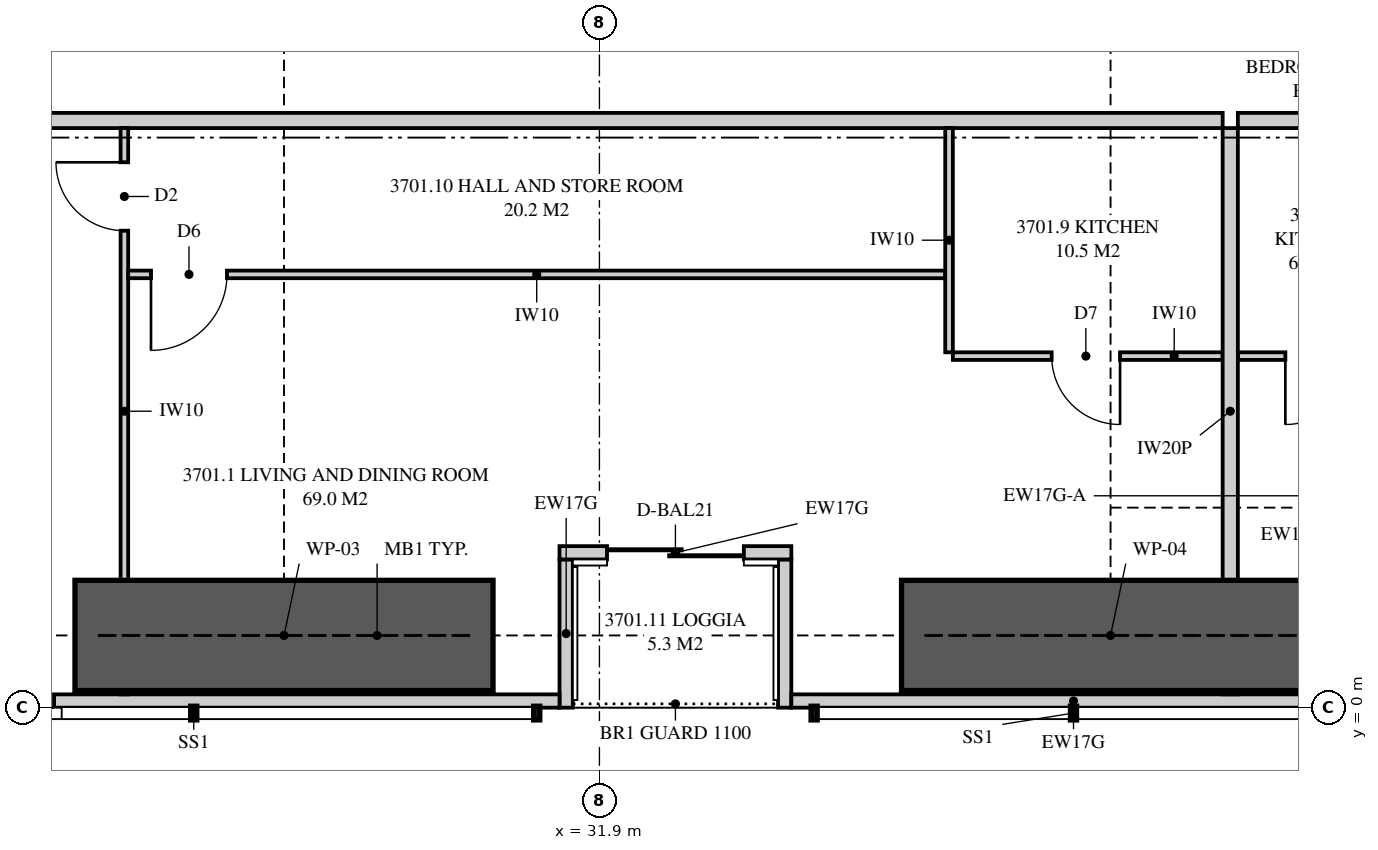
"""IFC4 building model, lengths in metres.
Left out: names, types, materials, properties, quantities, classifications, styles, units other than length and angle.
Written with IfcOpenShell. Run it as: python <this file> out.ifc"""

import sys

from ifc_helpers import new_model, si_unit, direction, frame, frame_2d, origin, place, context, subcontext, project, spatial, polyline, rectangle, outline, extrude, element, fill, save


model = new_model("IFC4")
c1 = context("Model", 3, precision=1e-05, world=origin(), true_north=direction((0.0, 1.0)))
c2 = subcontext(c1, "Body", "Model", "MODEL_VIEW")
j1 = project(units=[si_unit("LENGTHUNIT", "METRE"), si_unit("PLANEANGLEUNIT", "RADIAN")], contexts=[c1])
p1 = place(None, origin())
s1 = spatial("IfcSite", under=j1, at=p1, CompositionType="ELEMENT")
p2 = place(p1, origin())
s2 = spatial("IfcBuilding", under=s1, at=p2, CompositionType="ELEMENT")
p3 = place(p2, frame((0.0, 0.0, 135.0)))
s3 = spatial("IfcBuildingStorey", under=s2, at=p3, CompositionType="ELEMENT", Elevation=135.0)
p4 = place(p3, frame((9.051, 0.087, 0.0), z_axis=(0.0, 0.0, 1.0), x_axis=(1.0, 0.0, 0.0)))
e1 = element("IfcWall", 1, at=p4, inside=s3, PredefinedType="SOLIDWALL", context=c2, shape_type="SweptSolid", body=[
    extrude(outline(polyline([(0.0, 0.0), (22.324, 0.0), (22.324, 2.15), (7.824, 2.15), (7.824, 3.11), (7.666, 3.11), (7.666, 2.15), (7.62, 2.15), (7.62, 3.11), (0.0, 3.11), (0.0, 0.0)])), frame((0.0, 0.087, 0.0), z_axis=(0.0, -1.0, 0.0), x_axis=(1.0, 0.0, 0.0)), (0.0, 0.0, 1.0), 0.175),
])
p5 = place(p4, frame((3.134, 0.0, 0.4)))
e2 = element("IfcOpeningElement", 2, at=p5, cuts=e1, PredefinedType="OPENING", context=c2, shape_type="SweptSolid", body=[
    extrude(rectangle(XDim=1.8, YDim=1.7, at=frame_2d((0.9, 0.85))), frame((0.0, 0.097, 0.0), z_axis=(0.0, -1.0, 0.0), x_axis=(1.0, 0.0, 0.0)), (0.0, 0.0, 1.0), 0.195),
])
p6 = place(p4, frame((10.706, 0.0, 0.4)))
e3 = element("IfcOpeningElement", 3, at=p6, cuts=e1, PredefinedType="OPENING", context=c2, shape_type="SweptSolid", body=[
    extrude(rectangle(XDim=1.8, YDim=1.7, at=frame_2d((0.9, 0.85))), frame((0.0, 0.097, 0.0), z_axis=(0.0, -1.0, 0.0), x_axis=(1.0, 0.0, 0.0)), (0.0, 0.0, 1.0), 0.195),
])
p7 = place(p4, frame((13.874, 0.0, 0.4)))
e4 = element("IfcOpeningElement", 4, at=p7, cuts=e1, PredefinedType="OPENING", context=c2, shape_type="SweptSolid", body=[
    extrude(rectangle(XDim=1.8, YDim=1.7, at=frame_2d((0.9, 0.85))), frame((0.0, 0.097, 0.0), z_axis=(0.0, -1.0, 0.0), x_axis=(1.0, 0.0, 0.0)), (0.0, 0.0, 1.0), 0.195),
])
p8 = place(p3, frame((34.425, 0.087, 0.0), z_axis=(0.0, 0.0, 1.0), x_axis=(1.0, 0.0, 0.0)))
e5 = element("IfcWall", 5, at=p8, inside=s3, PredefinedType="SOLIDWALL", context=c2, shape_type="SweptSolid", body=[
    extrude(outline(polyline([(0.0, 0.0), (7.425, 0.0), (7.425, 3.11), (4.403, 3.11), (4.403, 2.15), (4.358, 2.15), (4.358, 3.11), (4.2, 3.11), (4.2, 2.15), (0.0, 2.15), (0.0, 0.0)])), frame((0.0, 0.087, 0.0), z_axis=(0.0, -1.0, 0.0), x_axis=(1.0, 0.0, 0.0)), (0.0, 0.0, 1.0), 0.175),
])
p9 = place(p3, frame((31.375, 2.038, 0.0), z_axis=(0.0, 0.0, 1.0), x_axis=(1.0, 0.0, 0.0)))
e6 = element("IfcWall", 6, at=p9, inside=s3, PredefinedType="SOLIDWALL", context=c2, shape_type="SweptSolid", body=[
    extrude(rectangle(XDim=3.05, YDim=0.175, at=frame_2d((1.525, 0.0))), origin(), (0.0, 0.0, 1.0), 3.11),
])
p10 = place(p9, frame((0.625, 0.0, 0.0)))
e7 = element("IfcOpeningElement", 7, at=p10, cuts=e6, PredefinedType="OPENING", context=c2, shape_type="SweptSolid", body=[
    extrude(rectangle(XDim=1.8, YDim=2.1, at=frame_2d((0.9, 1.05))), frame((0.0, 0.097, 0.0), z_axis=(0.0, -1.0, 0.0), x_axis=(1.0, 0.0, 0.0)), (0.0, 0.0, 1.0), 0.195),
])
for number, where, z_axis, x_axis in (
    (8, (31.462, 0.0, 0.0), (0.0, 0.0, 1.0), (0.0, 1.0, 0.0)),
    (9, (34.337, 0.0, 0.0), (0.0, 0.0, 1.0), (0.0, 1.0, 0.0)),
):
    element("IfcWall", number, at=place(p3, frame(where, z_axis=z_axis, x_axis=x_axis)), inside=s3, PredefinedType="SOLIDWALL", context=c2, shape_type="SweptSolid", body=[
        extrude(outline(polyline([(0.0, 0.0), (1.95, 0.0), (1.95, 3.11), (1.75, 3.11), (1.75, 2.15), (0.15, 2.15), (0.15, 3.11), (0.0, 3.11), (0.0, 0.0)])), frame((0.0, 0.087, 0.0), z_axis=(0.0, -1.0, 0.0), x_axis=(1.0, 0.0, 0.0)), (0.0, 0.0, 1.0), 0.175),
    ])
p11 = place(p3, frame((40.2, 0.175, 0.0), z_axis=(0.0, 0.0, 1.0), x_axis=(0.0, 1.0, 0.0)))
e10 = element("IfcWall", 10, at=p11, inside=s3, PredefinedType="PARTITIONING", context=c2, shape_type="SweptSolid", body=[
    extrude(outline(polyline([(0.167, 3.11), (0.0, 3.11), (0.0, 0.0), (0.529, 0.0), (0.529, 0.427), (1.021, 0.427), (1.021, 0.0), (7.45, 0.0), (7.45, 3.11), (3.766, 3.11), (3.766, 2.51), (2.025, 2.51), (2.025, 2.15), (1.021, 2.15), (1.021, 1.723), (0.529, 1.723), (0.529, 2.15), (0.167, 2.15), (0.167, 3.11)])), frame((0.0, 0.1, 0.0), z_axis=(0.0, -1.0, 0.0), x_axis=(1.0, 0.0, 0.0)), (0.0, 0.0, 1.0), 0.2),
])
p12 = place(p3, frame((17.775, 7.725, 0.0), z_axis=(0.0, 0.0, 1.0), x_axis=(1.0, 0.0, 0.0)))
e11 = element("IfcWall", 11, at=p12, inside=s3, PredefinedType="PARTITIONING", context=c2, shape_type="SweptSolid", body=[
    extrude(outline(polyline([(0.0, 0.0), (22.325, 0.0), (22.325, 3.11), (21.187, 3.11), (21.187, 2.541), (20.513, 2.541), (20.513, 3.11), (10.312, 3.11), (10.312, 2.541), (9.638, 2.541), (9.638, 3.11), (0.0, 3.11), (0.0, 0.0)])), frame((0.0, 0.1, 0.0), z_axis=(0.0, -1.0, 0.0), x_axis=(1.0, 0.0, 0.0)), (0.0, 0.0, 1.0), 0.2),
])
p13 = place(p12, frame((4.825, 0.0, 0.0)))
e12 = element("IfcOpeningElement", 12, at=p13, cuts=e11, PredefinedType="OPENING", context=c2, shape_type="SweptSolid", body=[
    extrude(rectangle(XDim=1.05, YDim=2.2, at=frame_2d((0.525, 1.1))), frame((0.0, 0.11, 0.0), z_axis=(0.0, -1.0, 0.0), x_axis=(1.0, 0.0, 0.0)), (0.0, 0.0, 1.0), 0.22),
])
p14 = place(p3, frame((25.65, 0.175, 0.0), z_axis=(0.0, 0.0, 1.0), x_axis=(0.0, 1.0, 0.0)))
e13 = element("IfcWall", 13, at=p14, inside=s3, PredefinedType="PARTITIONING", context=c2, shape_type="SweptSolid", body=[
    extrude(outline(polyline([(0.529, 2.15), (0.0, 2.15), (0.0, 0.0), (0.529, 0.0), (0.529, 0.034), (1.021, 0.034), (1.021, 0.0), (7.45, 0.0), (7.45, 3.11), (1.635, 3.11), (1.635, 2.15), (1.021, 2.15), (1.021, 2.116), (0.529, 2.116), (0.529, 2.15)])), frame((0.0, 0.05, 0.0), z_axis=(0.0, -1.0, 0.0), x_axis=(1.0, 0.0, 0.0)), (0.0, 0.0, 1.0), 0.1),
])
p15 = place(p14, frame((6.1, 0.0, 0.0)))
e14 = element("IfcOpeningElement", 14, at=p15, cuts=e13, PredefinedType="OPENING", context=c2, shape_type="SweptSolid", body=[
    extrude(rectangle(XDim=0.9, YDim=2.1, at=frame_2d((0.45, 1.05))), frame((0.0, 0.06, 0.0), z_axis=(0.0, -1.0, 0.0), x_axis=(1.0, 0.0, 0.0)), (0.0, 0.0, 1.0), 0.12),
])
p16 = place(p3, frame((36.55, 4.625, 0.0), z_axis=(0.0, 0.0, 1.0), x_axis=(1.0, 0.0, 0.0)))
e15 = element("IfcWall", 15, at=p16, inside=s3, PredefinedType="PARTITIONING", context=c2, shape_type="SweptSolid", body=[
    extrude(outline(polyline([(0.0, 0.0), (3.55, 0.0), (3.55, 3.11), (2.362, 3.11), (2.362, 2.541), (1.788, 2.541), (1.788, 3.11), (0.0, 3.11), (0.0, 0.0)])), frame((0.0, 0.05, 0.0), z_axis=(0.0, -1.0, 0.0), x_axis=(1.0, 0.0, 0.0)), (0.0, 0.0, 1.0), 0.1),
])
p17 = place(p16, frame((1.3, 0.0, 0.0)))
e16 = element("IfcOpeningElement", 16, at=p17, cuts=e15, PredefinedType="OPENING", context=c2, shape_type="SweptSolid", body=[
    extrude(rectangle(XDim=0.9, YDim=2.1, at=frame_2d((0.45, 1.05))), frame((0.0, 0.06, 0.0), z_axis=(0.0, -1.0, 0.0), x_axis=(1.0, 0.0, 0.0)), (0.0, 0.0, 1.0), 0.12),
])
p18 = place(p3, frame((36.5, 4.675, 0.0), z_axis=(0.0, 0.0, 1.0), x_axis=(0.0, 1.0, 0.0)))
e17 = element("IfcWall", 17, at=p18, inside=s3, PredefinedType="PARTITIONING", context=c2, shape_type="SweptSolid", body=[
    extrude(rectangle(XDim=2.95, YDim=0.1, at=frame_2d((1.475, 0.0))), origin(), (0.0, 0.0, 1.0), 3.11),
])
p19 = place(p3, frame((25.7, 5.7, 0.0), z_axis=(0.0, 0.0, 1.0), x_axis=(1.0, 0.0, 0.0)))
e18 = element("IfcWall", 18, at=p19, inside=s3, PredefinedType="PARTITIONING", context=c2, shape_type="SweptSolid", body=[
    extrude(outline(polyline([(0.0, 0.0), (10.75, 0.0), (10.75, 3.11), (2.337, 3.11), (2.337, 2.541), (1.763, 2.541), (1.763, 3.11), (0.0, 3.11), (0.0, 0.0)])), frame((0.0, 0.05, 0.0), z_axis=(0.0, -1.0, 0.0), x_axis=(1.0, 0.0, 0.0)), (0.0, 0.0, 1.0), 0.1),
])
p20 = place(p19, frame((0.3, 0.0, 0.0)))
e19 = element("IfcOpeningElement", 19, at=p20, cuts=e18, PredefinedType="OPENING", context=c2, shape_type="SweptSolid", body=[
    extrude(rectangle(XDim=1.0, YDim=2.1, at=frame_2d((0.5, 1.05))), frame((0.0, 0.06, 0.0), z_axis=(0.0, -1.0, 0.0), x_axis=(1.0, 0.0, 0.0)), (0.0, 0.0, 1.0), 0.12),
])
p21 = place(p3, frame((40.3, 7.725, 0.0), z_axis=(0.0, 0.0, 1.0), x_axis=(1.0, 0.0, 0.0)))
e20 = element("IfcWall", 20, at=p21, inside=s3, PredefinedType="PARTITIONING", context=c2, shape_type="SweptSolid", body=[
    extrude(rectangle(XDim=5.725, YDim=0.2, at=frame_2d((2.862, 0.0))), origin(), (0.0, 0.0, 1.0), 3.11),
])
p22 = place(p21, frame((4.05, 0.0, 0.0)))
e21 = element("IfcOpeningElement", 21, at=p22, cuts=e20, PredefinedType="OPENING", context=c2, shape_type="SweptSolid", body=[
    extrude(rectangle(XDim=1.05, YDim=2.2, at=frame_2d((0.525, 1.1))), frame((0.0, 0.11, 0.0), z_axis=(0.0, -1.0, 0.0), x_axis=(1.0, 0.0, 0.0)), (0.0, 0.0, 1.0), 0.22),
])
p23 = place(p3, frame((40.3, 4.625, 0.0), z_axis=(0.0, 0.0, 1.0), x_axis=(1.0, 0.0, 0.0)))
e22 = element("IfcWall", 22, at=p23, inside=s3, PredefinedType="PARTITIONING", context=c2, shape_type="SweptSolid", body=[
    extrude(rectangle(XDim=2.075, YDim=0.1, at=frame_2d((1.038, 0.0))), origin(), (0.0, 0.0, 1.0), 3.11),
])
p24 = place(p23, frame((0.625, 0.0, 0.0)))
e23 = element("IfcOpeningElement", 23, at=p24, cuts=e22, PredefinedType="OPENING", context=c2, shape_type="SweptSolid", body=[
    extrude(rectangle(XDim=0.9, YDim=2.1, at=frame_2d((0.45, 1.05))), frame((0.0, 0.06, 0.0), z_axis=(0.0, -1.0, 0.0), x_axis=(1.0, 0.0, 0.0)), (0.0, 0.0, 1.0), 0.12),
])
for number, where, z_axis, x_axis in (
    (24, (25.0, 0.95, 0.0), (0.0, 0.0, 1.0), (1.0, 0.0, 0.0)),
    (25, (35.875, 0.95, 0.0), (0.0, 0.0, 1.0), (1.0, 0.0, 0.0)),
):
    element("IfcWall", number, at=place(p3, frame(where, z_axis=z_axis, x_axis=x_axis)), inside=s3, PredefinedType="SHEAR", context=c2, shape_type="SweptSolid", body=[
        extrude(rectangle(XDim=5.5, YDim=1.45, at=frame_2d((2.75, 0.0))), origin(), (0.0, 0.0, 1.0), 3.35),
    ])
p25 = place(p7, origin())
e26 = element("IfcWindow", 26, at=p25, inside=s3, PartitioningType="SINGLE_PANEL", PredefinedType="WINDOW", context=c2, shape_type="SweptSolid", body=[
    extrude(rectangle(XDim=1.8, YDim=1.7, at=frame_2d((0.9, 0.85))), frame((0.0, 0.03, 0.0), z_axis=(0.0, -1.0, 0.0), x_axis=(1.0, 0.0, 0.0)), (0.0, 0.0, 1.0), 0.06),
])
fill(e4, e26)
p26 = place(p10, origin())
e27 = element("IfcDoor", 27, at=p26, inside=s3, OperationType="SLIDING_TO_LEFT", PredefinedType="DOOR", context=c2, shape_type="SweptSolid", body=[
    extrude(rectangle(XDim=1.8, YDim=2.1, at=frame_2d((0.9, 1.05))), frame((0.0, 0.025, 0.0), z_axis=(0.0, -1.0, 0.0), x_axis=(1.0, 0.0, 0.0)), (0.0, 0.0, 1.0), 0.05),
])
fill(e7, e27)
p27 = place(p15, origin())
e28 = element("IfcDoor", 28, at=p27, inside=s3, OperationType="SINGLE_SWING_RIGHT", PredefinedType="DOOR", context=c2, shape_type="SweptSolid", body=[
    extrude(rectangle(XDim=0.9, YDim=2.1, at=frame_2d((0.45, 1.05))), frame((0.0, 0.025, 0.0), z_axis=(0.0, -1.0, 0.0), x_axis=(1.0, 0.0, 0.0)), (0.0, 0.0, 1.0), 0.05),
])
fill(e14, e28)
p28 = place(p17, frame((0.9, 0.0, 0.0), z_axis=(0.0, 0.0, 1.0), x_axis=(-1.0, 0.0, 0.0)))
e29 = element("IfcDoor", 29, at=p28, inside=s3, OperationType="SINGLE_SWING_LEFT", PredefinedType="DOOR", context=c2, shape_type="SweptSolid", body=[
    extrude(rectangle(XDim=0.9, YDim=2.1, at=frame_2d((0.45, 1.05))), frame((0.0, 0.025, 0.0), z_axis=(0.0, -1.0, 0.0), x_axis=(1.0, 0.0, 0.0)), (0.0, 0.0, 1.0), 0.05),
])
fill(e16, e29)
p29 = place(p20, frame((1.0, 0.0, 0.0), z_axis=(0.0, 0.0, 1.0), x_axis=(-1.0, 0.0, 0.0)))
e30 = element("IfcDoor", 30, at=p29, inside=s3, OperationType="SINGLE_SWING_RIGHT", PredefinedType="DOOR", context=c2, shape_type="SweptSolid", body=[
    extrude(rectangle(XDim=1.0, YDim=2.1, at=frame_2d((0.5, 1.05))), frame((0.0, 0.025, 0.0), z_axis=(0.0, -1.0, 0.0), x_axis=(1.0, 0.0, 0.0)), (0.0, 0.0, 1.0), 0.05),
])
fill(e19, e30)
p30 = place(p24, frame((0.9, 0.0, 0.0), z_axis=(0.0, 0.0, 1.0), x_axis=(-1.0, 0.0, 0.0)))
e31 = element("IfcDoor", 31, at=p30, inside=s3, OperationType="SINGLE_SWING_RIGHT", PredefinedType="DOOR", context=c2, shape_type="SweptSolid", body=[
    extrude(rectangle(XDim=0.9, YDim=2.1, at=frame_2d((0.45, 1.05))), frame((0.0, 0.025, 0.0), z_axis=(0.0, -1.0, 0.0), x_axis=(1.0, 0.0, 0.0)), (0.0, 0.0, 1.0), 0.05),
])
fill(e23, e31)
save(model, sys.argv[1])
